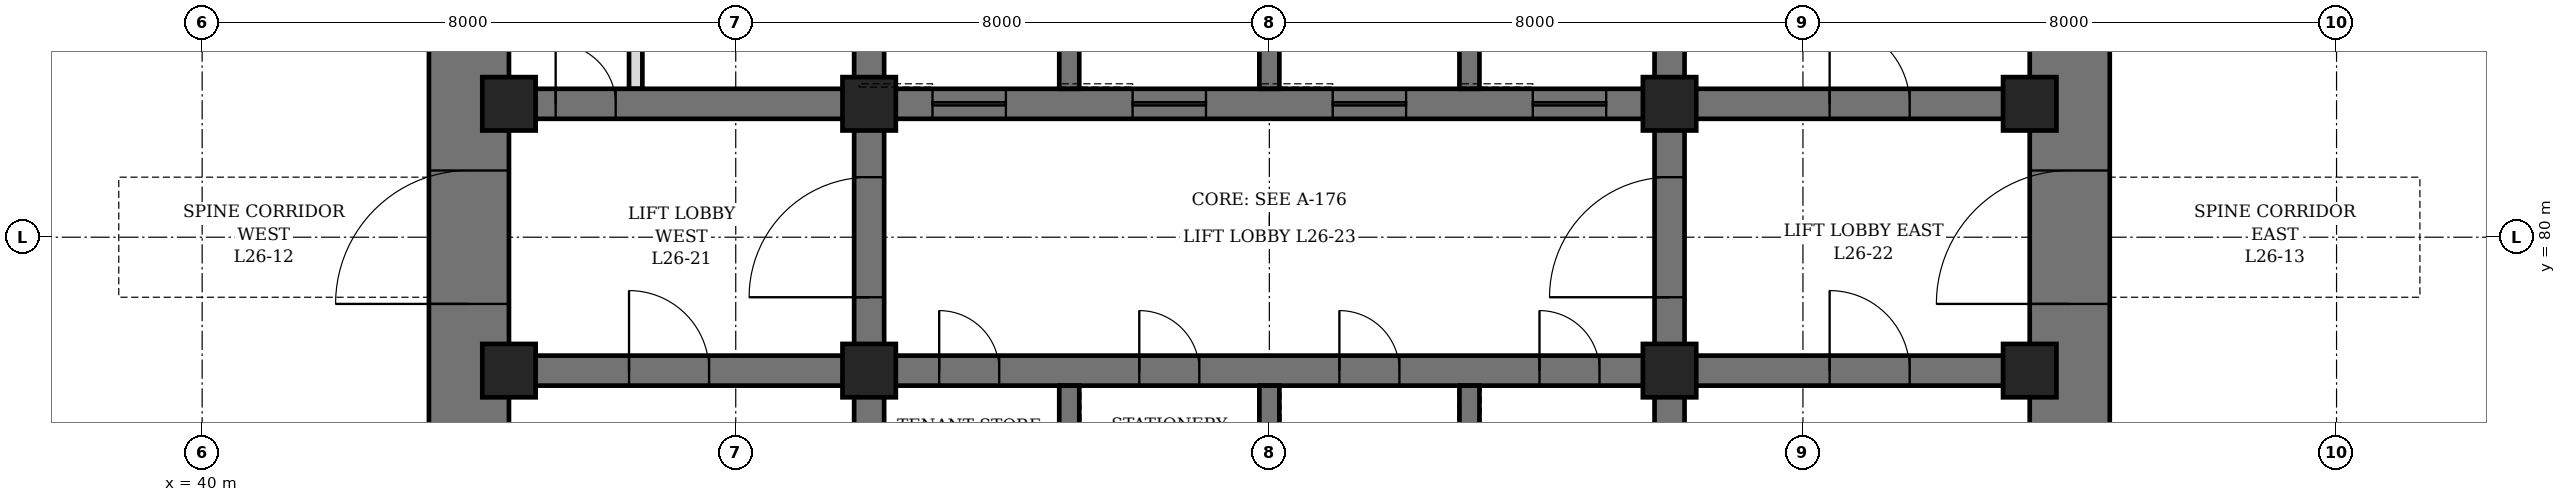
"""IFC4 building model, lengths in metres.
Left out: names, types, materials, properties, quantities, classifications, styles, units other than length and angle.
Written with IfcOpenShell. Run it as: python <this file> out.ifc"""

import sys

from ifc_helpers import new_model, si_unit, direction, frame, frame_2d, origin, origin_2d, place, context, subcontext, project, spatial, rectangle, hollow_rectangle, extrude, element, fill, save


model = new_model("IFC4")
c1 = context("Model", 3, precision=1e-05, world=origin(), true_north=direction((0.0, 1.0)))
c2 = subcontext(c1, "Body", "Model", "MODEL_VIEW")
j1 = project(units=[si_unit("LENGTHUNIT", "METRE"), si_unit("PLANEANGLEUNIT", "RADIAN")], contexts=[c1])
p1 = place(None, origin())
s1 = spatial("IfcSite", under=j1, at=p1, CompositionType="ELEMENT")
p2 = place(p1, origin())
s2 = spatial("IfcBuilding", under=s1, at=p2, CompositionType="ELEMENT")
p3 = place(p2, frame((0.0, 0.0, 120.7)))
s3 = spatial("IfcBuildingStorey", under=s2, at=p3, CompositionType="ELEMENT", Elevation=120.7)
p4 = place(p3, frame((44.0, 70.4, 0.0), z_axis=(0.0, 0.0, 1.0), x_axis=(0.0, 1.0, 0.0)))
e1 = element("IfcWall", 1, at=p4, inside=s3, PredefinedType="SHEAR", context=c2, shape_type="SweptSolid", body=[
    extrude(rectangle(XDim=19.2, YDim=1.2, at=frame_2d((9.6, 0.0))), origin(), (0.0, 0.0, 1.0), 4.2),
])
p5 = place(p4, frame((8.6, 0.0, 0.0)))
e2 = element("IfcOpeningElement", 2, at=p5, cuts=e1, PredefinedType="OPENING", context=c2, shape_type="SweptSolid", body=[
    extrude(rectangle(XDim=2.0, YDim=2.4, at=frame_2d((1.0, 1.2))), frame((0.0, 0.61, 0.0), z_axis=(0.0, -1.0, 0.0), x_axis=(1.0, 0.0, 0.0)), (0.0, 0.0, 1.0), 1.22),
])
p6 = place(p3, frame((68.0, 70.4, 0.0), z_axis=(0.0, 0.0, 1.0), x_axis=(0.0, 1.0, 0.0)))
e3 = element("IfcWall", 3, at=p6, inside=s3, PredefinedType="SHEAR", context=c2, shape_type="SweptSolid", body=[
    extrude(rectangle(XDim=19.2, YDim=1.2, at=frame_2d((9.6, 0.0))), origin(), (0.0, 0.0, 1.0), 4.2),
])
p7 = place(p6, frame((8.6, 0.0, 0.0)))
e4 = element("IfcOpeningElement", 4, at=p7, cuts=e3, PredefinedType="OPENING", context=c2, shape_type="SweptSolid", body=[
    extrude(rectangle(XDim=2.0, YDim=2.4, at=frame_2d((1.0, 1.2))), frame((0.0, 0.61, 0.0), z_axis=(0.0, -1.0, 0.0), x_axis=(1.0, 0.0, 0.0)), (0.0, 0.0, 1.0), 1.22),
])
p8 = place(p3, frame((50.0, 71.6, 0.0), z_axis=(0.0, 0.0, 1.0), x_axis=(0.0, 1.0, 0.0)))
e5 = element("IfcWall", 5, at=p8, inside=s3, PredefinedType="SHEAR", context=c2, shape_type="SweptSolid", body=[
    extrude(rectangle(XDim=16.8, YDim=0.45, at=frame_2d((8.4, 0.0))), origin(), (0.0, 0.0, 1.0), 4.2),
])
p9 = place(p8, frame((7.5, 0.0, 0.0)))
e6 = element("IfcOpeningElement", 6, at=p9, cuts=e5, PredefinedType="OPENING", context=c2, shape_type="SweptSolid", body=[
    extrude(rectangle(XDim=1.8, YDim=2.4, at=frame_2d((0.9, 1.2))), frame((0.0, 0.235, 0.0), z_axis=(0.0, -1.0, 0.0), x_axis=(1.0, 0.0, 0.0)), (0.0, 0.0, 1.0), 0.47),
])
p10 = place(p3, frame((62.0, 71.6, 0.0), z_axis=(0.0, 0.0, 1.0), x_axis=(0.0, 1.0, 0.0)))
e7 = element("IfcWall", 7, at=p10, inside=s3, PredefinedType="SHEAR", context=c2, shape_type="SweptSolid", body=[
    extrude(rectangle(XDim=16.8, YDim=0.45, at=frame_2d((8.4, 0.0))), origin(), (0.0, 0.0, 1.0), 4.2),
])
p11 = place(p10, frame((7.5, 0.0, 0.0)))
e8 = element("IfcOpeningElement", 8, at=p11, cuts=e7, PredefinedType="OPENING", context=c2, shape_type="SweptSolid", body=[
    extrude(rectangle(XDim=1.8, YDim=2.4, at=frame_2d((0.9, 1.2))), frame((0.0, 0.235, 0.0), z_axis=(0.0, -1.0, 0.0), x_axis=(1.0, 0.0, 0.0)), (0.0, 0.0, 1.0), 0.47),
])
p12 = place(p3, frame((44.6, 78.0, 0.0), z_axis=(0.0, 0.0, 1.0), x_axis=(1.0, 0.0, 0.0)))
e9 = element("IfcWall", 9, at=p12, inside=s3, PredefinedType="SHEAR", context=c2, shape_type="SweptSolid", body=[
    extrude(rectangle(XDim=5.175, YDim=0.45, at=frame_2d((2.587, 0.0))), origin(), (0.0, 0.0, 1.0), 4.2),
])
p13 = place(p12, frame((1.8, 0.0, 0.0)))
e10 = element("IfcOpeningElement", 10, at=p13, cuts=e9, PredefinedType="OPENING", context=c2, shape_type="SweptSolid", body=[
    extrude(rectangle(XDim=1.2, YDim=2.1, at=frame_2d((0.6, 1.05))), frame((0.0, 0.235, 0.0), z_axis=(0.0, -1.0, 0.0), x_axis=(1.0, 0.0, 0.0)), (0.0, 0.0, 1.0), 0.47),
])
p14 = place(p3, frame((44.6, 82.0, 0.0), z_axis=(0.0, 0.0, 1.0), x_axis=(1.0, 0.0, 0.0)))
e11 = element("IfcWall", 11, at=p14, inside=s3, PredefinedType="SHEAR", context=c2, shape_type="SweptSolid", body=[
    extrude(rectangle(XDim=5.175, YDim=0.45, at=frame_2d((2.587, 0.0))), origin(), (0.0, 0.0, 1.0), 4.2),
])
p15 = place(p14, frame((0.7, 0.0, 0.0)))
e12 = element("IfcOpeningElement", 12, at=p15, cuts=e11, PredefinedType="OPENING", context=c2, shape_type="SweptSolid", body=[
    extrude(rectangle(XDim=0.9, YDim=2.1, at=frame_2d((0.45, 1.05))), frame((0.0, 0.235, 0.0), z_axis=(0.0, -1.0, 0.0), x_axis=(1.0, 0.0, 0.0)), (0.0, 0.0, 1.0), 0.47),
])
p16 = place(p3, frame((62.225, 78.0, 0.0), z_axis=(0.0, 0.0, 1.0), x_axis=(1.0, 0.0, 0.0)))
e13 = element("IfcWall", 13, at=p16, inside=s3, PredefinedType="SHEAR", context=c2, shape_type="SweptSolid", body=[
    extrude(rectangle(XDim=5.175, YDim=0.45, at=frame_2d((2.587, 0.0))), origin(), (0.0, 0.0, 1.0), 4.2),
])
p17 = place(p16, frame((2.175, 0.0, 0.0)))
e14 = element("IfcOpeningElement", 14, at=p17, cuts=e13, PredefinedType="OPENING", context=c2, shape_type="SweptSolid", body=[
    extrude(rectangle(XDim=1.2, YDim=2.1, at=frame_2d((0.6, 1.05))), frame((0.0, 0.235, 0.0), z_axis=(0.0, -1.0, 0.0), x_axis=(1.0, 0.0, 0.0)), (0.0, 0.0, 1.0), 0.47),
])
p18 = place(p3, frame((62.225, 82.0, 0.0), z_axis=(0.0, 0.0, 1.0), x_axis=(1.0, 0.0, 0.0)))
e15 = element("IfcWall", 15, at=p18, inside=s3, PredefinedType="SHEAR", context=c2, shape_type="SweptSolid", body=[
    extrude(rectangle(XDim=5.175, YDim=0.45, at=frame_2d((2.587, 0.0))), origin(), (0.0, 0.0, 1.0), 4.2),
])
p19 = place(p18, frame((2.175, 0.0, 0.0)))
e16 = element("IfcOpeningElement", 16, at=p19, cuts=e15, PredefinedType="OPENING", context=c2, shape_type="SweptSolid", body=[
    extrude(rectangle(XDim=1.2, YDim=2.1, at=frame_2d((0.6, 1.05))), frame((0.0, 0.235, 0.0), z_axis=(0.0, -1.0, 0.0), x_axis=(1.0, 0.0, 0.0)), (0.0, 0.0, 1.0), 0.47),
])
p20 = place(p3, frame((50.225, 78.0, 0.0), z_axis=(0.0, 0.0, 1.0), x_axis=(1.0, 0.0, 0.0)))
e17 = element("IfcWall", 17, at=p20, inside=s3, PredefinedType="SHEAR", context=c2, shape_type="SweptSolid", body=[
    extrude(rectangle(XDim=11.55, YDim=0.45, at=frame_2d((5.775, 0.0))), origin(), (0.0, 0.0, 1.0), 4.2),
])
p21 = place(p20, frame((0.825, 0.0, 0.0)))
e18 = element("IfcOpeningElement", 18, at=p21, cuts=e17, PredefinedType="OPENING", context=c2, shape_type="SweptSolid", body=[
    extrude(rectangle(XDim=0.9, YDim=2.1, at=frame_2d((0.45, 1.05))), frame((0.0, 0.235, 0.0), z_axis=(0.0, -1.0, 0.0), x_axis=(1.0, 0.0, 0.0)), (0.0, 0.0, 1.0), 0.47),
])
p22 = place(p20, frame((3.825, 0.0, 0.0)))
e19 = element("IfcOpeningElement", 19, at=p22, cuts=e17, PredefinedType="OPENING", context=c2, shape_type="SweptSolid", body=[
    extrude(rectangle(XDim=0.9, YDim=2.1, at=frame_2d((0.45, 1.05))), frame((0.0, 0.235, 0.0), z_axis=(0.0, -1.0, 0.0), x_axis=(1.0, 0.0, 0.0)), (0.0, 0.0, 1.0), 0.47),
])
p23 = place(p20, frame((6.825, 0.0, 0.0)))
e20 = element("IfcOpeningElement", 20, at=p23, cuts=e17, PredefinedType="OPENING", context=c2, shape_type="SweptSolid", body=[
    extrude(rectangle(XDim=0.9, YDim=2.1, at=frame_2d((0.45, 1.05))), frame((0.0, 0.235, 0.0), z_axis=(0.0, -1.0, 0.0), x_axis=(1.0, 0.0, 0.0)), (0.0, 0.0, 1.0), 0.47),
])
p24 = place(p20, frame((9.825, 0.0, 0.0)))
e21 = element("IfcOpeningElement", 21, at=p24, cuts=e17, PredefinedType="OPENING", context=c2, shape_type="SweptSolid", body=[
    extrude(rectangle(XDim=0.9, YDim=2.1, at=frame_2d((0.45, 1.05))), frame((0.0, 0.235, 0.0), z_axis=(0.0, -1.0, 0.0), x_axis=(1.0, 0.0, 0.0)), (0.0, 0.0, 1.0), 0.47),
])
p25 = place(p3, frame((50.225, 82.0, 0.0), z_axis=(0.0, 0.0, 1.0), x_axis=(1.0, 0.0, 0.0)))
e22 = element("IfcWall", 22, at=p25, inside=s3, PredefinedType="SHEAR", context=c2, shape_type="SweptSolid", body=[
    extrude(rectangle(XDim=11.55, YDim=0.45, at=frame_2d((5.775, 0.0))), origin(), (0.0, 0.0, 1.0), 4.2),
])
p26 = place(p25, frame((0.725, 0.0, 0.0)))
e23 = element("IfcOpeningElement", 23, at=p26, cuts=e22, PredefinedType="OPENING", context=c2, shape_type="SweptSolid", body=[
    extrude(rectangle(XDim=1.1, YDim=2.2, at=frame_2d((0.55, 1.1))), frame((0.0, 0.235, 0.0), z_axis=(0.0, -1.0, 0.0), x_axis=(1.0, 0.0, 0.0)), (0.0, 0.0, 1.0), 0.47),
])
p27 = place(p25, frame((3.725, 0.0, 0.0)))
e24 = element("IfcOpeningElement", 24, at=p27, cuts=e22, PredefinedType="OPENING", context=c2, shape_type="SweptSolid", body=[
    extrude(rectangle(XDim=1.1, YDim=2.2, at=frame_2d((0.55, 1.1))), frame((0.0, 0.235, 0.0), z_axis=(0.0, -1.0, 0.0), x_axis=(1.0, 0.0, 0.0)), (0.0, 0.0, 1.0), 0.47),
])
p28 = place(p25, frame((6.725, 0.0, 0.0)))
e25 = element("IfcOpeningElement", 25, at=p28, cuts=e22, PredefinedType="OPENING", context=c2, shape_type="SweptSolid", body=[
    extrude(rectangle(XDim=1.1, YDim=2.2, at=frame_2d((0.55, 1.1))), frame((0.0, 0.235, 0.0), z_axis=(0.0, -1.0, 0.0), x_axis=(1.0, 0.0, 0.0)), (0.0, 0.0, 1.0), 0.47),
])
p29 = place(p25, frame((9.725, 0.0, 0.0)))
e26 = element("IfcOpeningElement", 26, at=p29, cuts=e22, PredefinedType="OPENING", context=c2, shape_type="SweptSolid", body=[
    extrude(rectangle(XDim=1.1, YDim=2.2, at=frame_2d((0.55, 1.1))), frame((0.0, 0.235, 0.0), z_axis=(0.0, -1.0, 0.0), x_axis=(1.0, 0.0, 0.0)), (0.0, 0.0, 1.0), 0.47),
])
p30 = place(p3, frame((53.0, 74.15, 0.0), z_axis=(0.0, 0.0, 1.0), x_axis=(0.0, 1.0, 0.0)))
e27 = element("IfcWall", 27, at=p30, inside=s3, PredefinedType="SHEAR", context=c2, shape_type="SweptSolid", body=[
    extrude(rectangle(XDim=3.625, YDim=0.3, at=frame_2d((1.812, 0.0))), origin(), (0.0, 0.0, 1.0), 4.2),
])
p31 = place(p3, frame((53.0, 82.225, 0.0), z_axis=(0.0, 0.0, 1.0), x_axis=(0.0, 1.0, 0.0)))
e28 = element("IfcWall", 28, at=p31, inside=s3, PredefinedType="SHEAR", context=c2, shape_type="SweptSolid", body=[
    extrude(rectangle(XDim=3.55, YDim=0.3, at=frame_2d((1.775, 0.0))), origin(), (0.0, 0.0, 1.0), 4.2),
])
p32 = place(p3, frame((56.0, 74.15, 0.0), z_axis=(0.0, 0.0, 1.0), x_axis=(0.0, 1.0, 0.0)))
e29 = element("IfcWall", 29, at=p32, inside=s3, PredefinedType="SHEAR", context=c2, shape_type="SweptSolid", body=[
    extrude(rectangle(XDim=3.625, YDim=0.3, at=frame_2d((1.812, 0.0))), origin(), (0.0, 0.0, 1.0), 4.2),
])
p33 = place(p3, frame((56.0, 82.225, 0.0), z_axis=(0.0, 0.0, 1.0), x_axis=(0.0, 1.0, 0.0)))
e30 = element("IfcWall", 30, at=p33, inside=s3, PredefinedType="SHEAR", context=c2, shape_type="SweptSolid", body=[
    extrude(rectangle(XDim=3.55, YDim=0.3, at=frame_2d((1.775, 0.0))), origin(), (0.0, 0.0, 1.0), 4.2),
])
p34 = place(p3, frame((59.0, 74.15, 0.0), z_axis=(0.0, 0.0, 1.0), x_axis=(0.0, 1.0, 0.0)))
e31 = element("IfcWall", 31, at=p34, inside=s3, PredefinedType="SHEAR", context=c2, shape_type="SweptSolid", body=[
    extrude(rectangle(XDim=3.625, YDim=0.3, at=frame_2d((1.812, 0.0))), origin(), (0.0, 0.0, 1.0), 4.2),
])
p35 = place(p3, frame((59.0, 82.225, 0.0), z_axis=(0.0, 0.0, 1.0), x_axis=(0.0, 1.0, 0.0)))
e32 = element("IfcWall", 32, at=p35, inside=s3, PredefinedType="SHEAR", context=c2, shape_type="SweptSolid", body=[
    extrude(rectangle(XDim=3.55, YDim=0.3, at=frame_2d((1.775, 0.0))), origin(), (0.0, 0.0, 1.0), 4.2),
])
for number, where, z_axis, x_axis in (
    (33, (44.6, 78.0, 0.0), (0.0, 0.0, 1.0), (1.0, 0.0, 0.0)),
    (34, (44.6, 82.0, 0.0), (0.0, 0.0, 1.0), (1.0, 0.0, 0.0)),
    (35, (50.0, 78.0, 0.0), (0.0, 0.0, 1.0), (1.0, 0.0, 0.0)),
    (36, (50.0, 82.0, 0.0), (0.0, 0.0, 1.0), (1.0, 0.0, 0.0)),
    (37, (62.0, 78.0, 0.0), (0.0, 0.0, 1.0), (1.0, 0.0, 0.0)),
    (38, (62.0, 82.0, 0.0), (0.0, 0.0, 1.0), (1.0, 0.0, 0.0)),
    (39, (67.4, 78.0, 0.0), (0.0, 0.0, 1.0), (1.0, 0.0, 0.0)),
    (40, (67.4, 82.0, 0.0), (0.0, 0.0, 1.0), (1.0, 0.0, 0.0)),
):
    element("IfcColumn", number, at=place(p3, frame(where, z_axis=z_axis, x_axis=x_axis)), inside=s3, PredefinedType="COLUMN", context=c2, shape_type="SweptSolid", body=[
        extrude(hollow_rectangle(XDim=0.8, YDim=0.8, WallThickness=0.1, at=origin_2d()), origin(), (0.0, 0.0, 1.0), 4.2),
    ])
p36 = place(p3, frame((46.5, 82.225, 0.0), z_axis=(0.0, 0.0, 1.0), x_axis=(0.0, 1.0, 0.0)))
e41 = element("IfcWall", 41, at=p36, inside=s3, PredefinedType="PARTITIONING", context=c2, shape_type="SweptSolid", body=[
    extrude(rectangle(XDim=3.05, YDim=0.2, at=frame_2d((1.525, 0.0))), origin(), (0.0, 0.0, 1.0), 4.04),
])
p37 = place(p36, frame((1.075, 0.0, 0.0)))
e42 = element("IfcOpeningElement", 42, at=p37, cuts=e41, PredefinedType="OPENING", context=c2, shape_type="SweptSolid", body=[
    extrude(rectangle(XDim=0.9, YDim=2.1, at=frame_2d((0.45, 1.05))), frame((0.0, 0.11, 0.0), z_axis=(0.0, -1.0, 0.0), x_axis=(1.0, 0.0, 0.0)), (0.0, 0.0, 1.0), 0.22),
])
p38 = place(p15, origin())
e43 = element("IfcDoor", 43, at=p38, inside=s3, OperationType="SINGLE_SWING_LEFT", PredefinedType="DOOR", context=c2, shape_type="SweptSolid", body=[
    extrude(rectangle(XDim=0.9, YDim=2.1, at=frame_2d((0.45, 1.05))), frame((0.0, 0.225, 0.0), z_axis=(0.0, -1.0, 0.0), x_axis=(1.0, 0.0, 0.0)), (0.0, 0.0, 1.0), 0.449),
])
fill(e12, e43)
p39 = place(p21, origin())
e44 = element("IfcDoor", 44, at=p39, inside=s3, OperationType="SINGLE_SWING_LEFT", PredefinedType="DOOR", context=c2, shape_type="SweptSolid", body=[
    extrude(rectangle(XDim=0.9, YDim=2.1, at=frame_2d((0.45, 1.05))), frame((0.0, 0.225, 0.0), z_axis=(0.0, -1.0, 0.0), x_axis=(1.0, 0.0, 0.0)), (0.0, 0.0, 1.0), 0.449),
])
fill(e18, e44)
p40 = place(p22, origin())
e45 = element("IfcDoor", 45, at=p40, inside=s3, OperationType="SINGLE_SWING_LEFT", PredefinedType="DOOR", context=c2, shape_type="SweptSolid", body=[
    extrude(rectangle(XDim=0.9, YDim=2.1, at=frame_2d((0.45, 1.05))), frame((0.0, 0.225, 0.0), z_axis=(0.0, -1.0, 0.0), x_axis=(1.0, 0.0, 0.0)), (0.0, 0.0, 1.0), 0.449),
])
fill(e19, e45)
p41 = place(p23, origin())
e46 = element("IfcDoor", 46, at=p41, inside=s3, OperationType="SINGLE_SWING_LEFT", PredefinedType="DOOR", context=c2, shape_type="SweptSolid", body=[
    extrude(rectangle(XDim=0.9, YDim=2.1, at=frame_2d((0.45, 1.05))), frame((0.0, 0.225, 0.0), z_axis=(0.0, -1.0, 0.0), x_axis=(1.0, 0.0, 0.0)), (0.0, 0.0, 1.0), 0.449),
])
fill(e20, e46)
p42 = place(p24, origin())
e47 = element("IfcDoor", 47, at=p42, inside=s3, OperationType="SINGLE_SWING_LEFT", PredefinedType="DOOR", context=c2, shape_type="SweptSolid", body=[
    extrude(rectangle(XDim=0.9, YDim=2.1, at=frame_2d((0.45, 1.05))), frame((0.0, 0.225, 0.0), z_axis=(0.0, -1.0, 0.0), x_axis=(1.0, 0.0, 0.0)), (0.0, 0.0, 1.0), 0.449),
])
fill(e21, e47)
p43 = place(p13, origin())
e48 = element("IfcDoor", 48, at=p43, inside=s3, OperationType="SINGLE_SWING_LEFT", PredefinedType="DOOR", context=c2, shape_type="SweptSolid", body=[
    extrude(rectangle(XDim=1.2, YDim=2.1, at=frame_2d((0.6, 1.05))), frame((0.0, 0.225, 0.0), z_axis=(0.0, -1.0, 0.0), x_axis=(1.0, 0.0, 0.0)), (0.0, 0.0, 1.0), 0.449),
])
fill(e10, e48)
p44 = place(p19, origin())
e49 = element("IfcDoor", 49, at=p44, inside=s3, OperationType="SINGLE_SWING_LEFT", PredefinedType="DOOR", context=c2, shape_type="SweptSolid", body=[
    extrude(rectangle(XDim=1.2, YDim=2.1, at=frame_2d((0.6, 1.05))), frame((0.0, 0.225, 0.0), z_axis=(0.0, -1.0, 0.0), x_axis=(1.0, 0.0, 0.0)), (0.0, 0.0, 1.0), 0.449),
])
fill(e16, e49)
p45 = place(p5, origin())
e50 = element("IfcDoor", 50, at=p45, inside=s3, OperationType="DOUBLE_DOOR_SINGLE_SWING", PredefinedType="DOOR", context=c2, shape_type="SweptSolid", body=[
    extrude(rectangle(XDim=2.0, YDim=2.4, at=frame_2d((1.0, 1.2))), frame((0.0, 0.35, 0.0), z_axis=(0.0, -1.0, 0.0), x_axis=(1.0, 0.0, 0.0)), (0.0, 0.0, 1.0), 0.7),
])
fill(e2, e50)
p46 = place(p7, origin())
e51 = element("IfcDoor", 51, at=p46, inside=s3, OperationType="DOUBLE_DOOR_SINGLE_SWING", PredefinedType="DOOR", context=c2, shape_type="SweptSolid", body=[
    extrude(rectangle(XDim=2.0, YDim=2.4, at=frame_2d((1.0, 1.2))), frame((0.0, 0.35, 0.0), z_axis=(0.0, -1.0, 0.0), x_axis=(1.0, 0.0, 0.0)), (0.0, 0.0, 1.0), 0.7),
])
fill(e4, e51)
p47 = place(p9, origin())
e52 = element("IfcDoor", 52, at=p47, inside=s3, OperationType="DOUBLE_DOOR_SINGLE_SWING", PredefinedType="DOOR", context=c2, shape_type="SweptSolid", body=[
    extrude(rectangle(XDim=1.8, YDim=2.4, at=frame_2d((0.9, 1.2))), frame((0.0, 0.225, 0.0), z_axis=(0.0, -1.0, 0.0), x_axis=(1.0, 0.0, 0.0)), (0.0, 0.0, 1.0), 0.449),
])
fill(e6, e52)
p48 = place(p11, origin())
e53 = element("IfcDoor", 53, at=p48, inside=s3, OperationType="DOUBLE_DOOR_SINGLE_SWING", PredefinedType="DOOR", context=c2, shape_type="SweptSolid", body=[
    extrude(rectangle(XDim=1.8, YDim=2.4, at=frame_2d((0.9, 1.2))), frame((0.0, 0.225, 0.0), z_axis=(0.0, -1.0, 0.0), x_axis=(1.0, 0.0, 0.0)), (0.0, 0.0, 1.0), 0.449),
])
fill(e8, e53)
p49 = place(p17, origin())
e54 = element("IfcDoor", 54, at=p49, inside=s3, OperationType="SINGLE_SWING_RIGHT", PredefinedType="DOOR", context=c2, shape_type="SweptSolid", body=[
    extrude(rectangle(XDim=1.2, YDim=2.1, at=frame_2d((0.6, 1.05))), frame((0.0, 0.225, 0.0), z_axis=(0.0, -1.0, 0.0), x_axis=(1.0, 0.0, 0.0)), (0.0, 0.0, 1.0), 0.449),
])
fill(e14, e54)
p50 = place(p26, origin())
e55 = element("IfcDoor", 55, at=p50, inside=s3, OperationType="SLIDING_TO_LEFT", PredefinedType="DOOR", context=c2, shape_type="SweptSolid", body=[
    extrude(rectangle(XDim=1.1, YDim=2.2, at=frame_2d((0.55, 1.1))), frame((0.0, 0.225, 0.0), z_axis=(0.0, -1.0, 0.0), x_axis=(1.0, 0.0, 0.0)), (0.0, 0.0, 1.0), 0.449),
])
fill(e23, e55)
p51 = place(p27, origin())
e56 = element("IfcDoor", 56, at=p51, inside=s3, OperationType="SLIDING_TO_LEFT", PredefinedType="DOOR", context=c2, shape_type="SweptSolid", body=[
    extrude(rectangle(XDim=1.1, YDim=2.2, at=frame_2d((0.55, 1.1))), frame((0.0, 0.225, 0.0), z_axis=(0.0, -1.0, 0.0), x_axis=(1.0, 0.0, 0.0)), (0.0, 0.0, 1.0), 0.449),
])
fill(e24, e56)
p52 = place(p28, origin())
e57 = element("IfcDoor", 57, at=p52, inside=s3, OperationType="SLIDING_TO_LEFT", PredefinedType="DOOR", context=c2, shape_type="SweptSolid", body=[
    extrude(rectangle(XDim=1.1, YDim=2.2, at=frame_2d((0.55, 1.1))), frame((0.0, 0.225, 0.0), z_axis=(0.0, -1.0, 0.0), x_axis=(1.0, 0.0, 0.0)), (0.0, 0.0, 1.0), 0.449),
])
fill(e25, e57)
p53 = place(p29, origin())
e58 = element("IfcDoor", 58, at=p53, inside=s3, OperationType="SLIDING_TO_LEFT", PredefinedType="DOOR", context=c2, shape_type="SweptSolid", body=[
    extrude(rectangle(XDim=1.1, YDim=2.2, at=frame_2d((0.55, 1.1))), frame((0.0, 0.225, 0.0), z_axis=(0.0, -1.0, 0.0), x_axis=(1.0, 0.0, 0.0)), (0.0, 0.0, 1.0), 0.449),
])
fill(e26, e58)
save(model, sys.argv[1])
